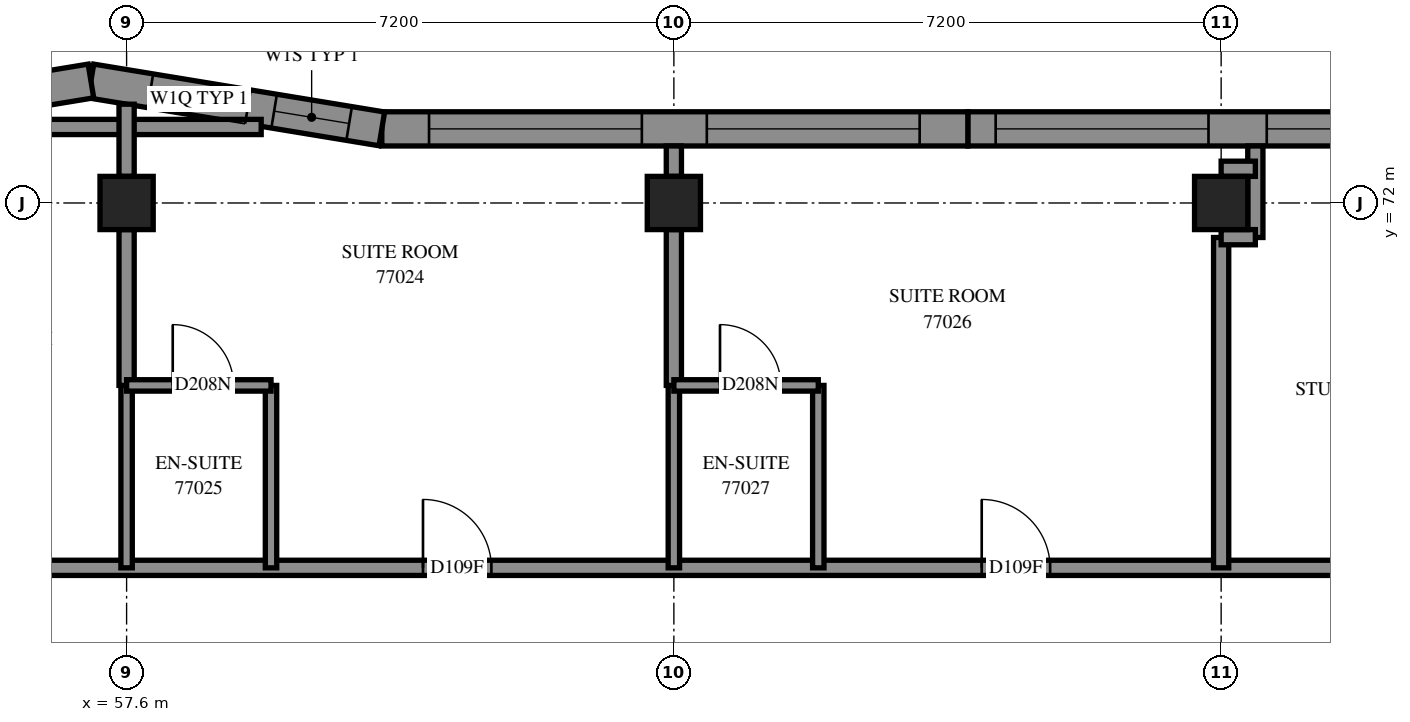
"""IFC4 building model, lengths in metres.
Left out: names, types, materials, properties, quantities, classifications, styles, units other than length and angle.
Written with IfcOpenShell. Run it as: python <this file> out.ifc"""

import sys

from ifc_helpers import new_model, si_unit, direction, frame, frame_2d, origin, origin_2d, place, context, subcontext, project, spatial, polyline, rectangle, outline, extrude, element, fill, save


model = new_model("IFC4")
c1 = context("Model", 3, precision=1e-05, world=origin(), true_north=direction((0.0, 1.0)))
c2 = subcontext(c1, "Body", "Model", "MODEL_VIEW")
j1 = project(units=[si_unit("LENGTHUNIT", "METRE"), si_unit("PLANEANGLEUNIT", "RADIAN")], contexts=[c1])
p1 = place(None, origin())
s1 = spatial("IfcSite", under=j1, at=p1, CompositionType="ELEMENT")
p2 = place(p1, origin())
s2 = spatial("IfcBuilding", under=s1, at=p2, CompositionType="ELEMENT")
p3 = place(p2, frame((0.0, 0.0, 281.2)))
s3 = spatial("IfcBuildingStorey", under=s2, at=p3, CompositionType="ELEMENT", Elevation=281.2)
for number, where, z_axis, x_axis in (
    (1, (57.6, 72.0, 0.0), (0.0, 0.0, 1.0), (1.0, 0.0, 0.0)),
    (2, (64.8, 72.0, 0.0), (0.0, 0.0, 1.0), (1.0, 0.0, 0.0)),
    (3, (72.0, 72.0, 0.0), (0.0, 0.0, 1.0), (1.0, 0.0, 0.0)),
):
    element("IfcColumn", number, at=place(p3, frame(where, z_axis=z_axis, x_axis=x_axis)), inside=s3, PredefinedType="COLUMN", context=c2, shape_type="SweptSolid", body=[
        extrude(rectangle(XDim=0.7, YDim=0.7, at=origin_2d()), origin(), (0.0, 0.0, 1.0), 3.1),
    ])
p4 = place(p3, frame((76.393, 72.975, 0.0), z_axis=(0.0, 0.0, 1.0), x_axis=(-1.0, 0.0, 0.0)))
e4 = element("IfcWall", 4, at=p4, inside=s3, PredefinedType="SOLIDWALL", context=c2, shape_type="SweptSolid", body=[
    extrude(outline(polyline([(0.035, -0.225), (7.726, -0.225), (7.726, 0.225), (-0.035, 0.225), (0.035, -0.225)])), origin(), (0.0, 0.0, 1.0), 3.1),
])
p5 = place(p4, frame((0.993, 0.0, 0.45)))
e5 = element("IfcOpeningElement", 5, at=p5, cuts=e4, PredefinedType="OPENING", context=c2, shape_type="SweptSolid", body=[
    extrude(rectangle(XDim=2.8, YDim=2.55, at=frame_2d((1.4, 1.275))), frame((0.0, 0.235, 0.0), z_axis=(0.0, -1.0, 0.0), x_axis=(1.0, 0.0, 0.0)), (0.0, 0.0, 1.0), 0.47),
])
p6 = place(p4, frame((4.56, 0.0, 0.45)))
e6 = element("IfcOpeningElement", 6, at=p6, cuts=e4, PredefinedType="OPENING", context=c2, shape_type="SweptSolid", body=[
    extrude(rectangle(XDim=2.8, YDim=2.55, at=frame_2d((1.4, 1.275))), frame((0.0, 0.235, 0.0), z_axis=(0.0, -1.0, 0.0), x_axis=(1.0, 0.0, 0.0)), (0.0, 0.0, 1.0), 0.47),
])
p7 = place(p3, frame((68.667, 72.975, 0.0), z_axis=(0.0, 0.0, 1.0), x_axis=(-1.0, 0.0, 0.0)))
e7 = element("IfcWall", 7, at=p7, inside=s3, PredefinedType="SOLIDWALL", context=c2, shape_type="SweptSolid", body=[
    extrude(outline(polyline([(0.0, -0.225), (7.691, -0.225), (7.728, 0.225), (0.0, 0.225), (0.0, -0.225)])), origin(), (0.0, 0.0, 1.0), 3.1),
])
p8 = place(p7, frame((0.634, 0.0, 0.45)))
e8 = element("IfcOpeningElement", 8, at=p8, cuts=e7, PredefinedType="OPENING", context=c2, shape_type="SweptSolid", body=[
    extrude(rectangle(XDim=2.8, YDim=2.55, at=frame_2d((1.4, 1.275))), frame((0.0, 0.235, 0.0), z_axis=(0.0, -1.0, 0.0), x_axis=(1.0, 0.0, 0.0)), (0.0, 0.0, 1.0), 0.47),
])
p9 = place(p7, frame((4.288, 0.0, 0.45)))
e9 = element("IfcOpeningElement", 9, at=p9, cuts=e7, PredefinedType="OPENING", context=c2, shape_type="SweptSolid", body=[
    extrude(rectangle(XDim=2.8, YDim=2.55, at=frame_2d((1.4, 1.275))), frame((0.0, 0.235, 0.0), z_axis=(0.0, -1.0, 0.0), x_axis=(1.0, 0.0, 0.0)), (0.0, 0.0, 1.0), 0.47),
])
p10 = place(p3, frame((60.958, 72.975, 0.0), z_axis=(0.0, 0.0, 1.0), x_axis=(-0.9867194815, 0.1624335703, 0.0)))
e10 = element("IfcWall", 10, at=p10, inside=s3, PredefinedType="SOLIDWALL", context=c2, shape_type="SweptSolid", body=[
    extrude(outline(polyline([(0.018, -0.225), (3.916, -0.225), (3.841, 0.225), (-0.018, 0.225), (0.018, -0.225)])), origin(), (0.0, 0.0, 1.0), 3.1),
])
p11 = place(p10, frame((0.436, 0.0, 0.45)))
e11 = element("IfcOpeningElement", 11, at=p11, cuts=e10, PredefinedType="OPENING", context=c2, shape_type="SweptSolid", body=[
    extrude(rectangle(XDim=1.0, YDim=2.5, at=frame_2d((0.5, 1.25))), frame((0.0, 0.235, 0.0), z_axis=(0.0, -1.0, 0.0), x_axis=(1.0, 0.0, 0.0)), (0.0, 0.0, 1.0), 0.47),
])
p12 = place(p10, frame((1.786, 0.0, 0.45)))
e12 = element("IfcOpeningElement", 12, at=p12, cuts=e10, PredefinedType="OPENING", context=c2, shape_type="SweptSolid", body=[
    extrude(rectangle(XDim=1.3, YDim=2.5, at=frame_2d((0.65, 1.25))), frame((0.0, 0.235, 0.0), z_axis=(0.0, -1.0, 0.0), x_axis=(1.0, 0.0, 0.0)), (0.0, 0.0, 1.0), 0.47),
])
p13 = place(p3, frame((57.131, 73.605, 0.0), z_axis=(0.0, 0.0, 1.0), x_axis=(-0.9867201618, -0.1624294379, 0.0)))
e13 = element("IfcWall", 13, at=p13, inside=s3, PredefinedType="SOLIDWALL", context=c2, shape_type="SweptSolid", body=[
    extrude(outline(polyline([(-0.037, -0.225), (3.86, -0.225), (3.897, 0.225), (0.037, 0.225), (-0.037, -0.225)])), origin(), (0.0, 0.0, 1.0), 3.1),
])
p14 = place(p13, frame((1.005, 0.0, 0.45)))
e14 = element("IfcOpeningElement", 14, at=p14, cuts=e13, PredefinedType="OPENING", context=c2, shape_type="SweptSolid", body=[
    extrude(rectangle(XDim=1.2, YDim=2.55, at=frame_2d((0.6, 1.275))), frame((0.0, 0.235, 0.0), z_axis=(0.0, -1.0, 0.0), x_axis=(1.0, 0.0, 0.0)), (0.0, 0.0, 1.0), 0.47),
])
p15 = place(p3, frame((55.2, 67.2, 0.0), z_axis=(0.0, 0.0, 1.0), x_axis=(1.0, 0.0, 0.0)))
e15 = element("IfcWall", 15, at=p15, inside=s3, PredefinedType="PARTITIONING", context=c2, shape_type="SweptSolid", body=[
    extrude(rectangle(XDim=19.2, YDim=0.2, at=frame_2d((9.6, 0.0))), origin(), (0.0, 0.0, 1.0), 3.1),
])
p16 = place(p15, frame((6.299, 0.0, 0.0)))
e16 = element("IfcOpeningElement", 16, at=p16, cuts=e15, PredefinedType="OPENING", context=c2, shape_type="SweptSolid", body=[
    extrude(rectangle(XDim=0.9, YDim=2.1, at=frame_2d((0.45, 1.05))), frame((0.0, 0.11, 0.0), z_axis=(0.0, -1.0, 0.0), x_axis=(1.0, 0.0, 0.0)), (0.0, 0.0, 1.0), 0.22),
])
p17 = place(p15, frame((13.65, 0.0, 0.0)))
e17 = element("IfcOpeningElement", 17, at=p17, cuts=e15, PredefinedType="OPENING", context=c2, shape_type="SweptSolid", body=[
    extrude(rectangle(XDim=0.9, YDim=2.1, at=frame_2d((0.45, 1.05))), frame((0.0, 0.11, 0.0), z_axis=(0.0, -1.0, 0.0), x_axis=(1.0, 0.0, 0.0)), (0.0, 0.0, 1.0), 0.22),
])
p18 = place(p3, frame((54.891, 73.0, 0.0), z_axis=(0.0, 0.0, 1.0), x_axis=(1.0, 0.0, 0.0)))
e18 = element("IfcWall", 18, at=p18, inside=s3, PredefinedType="PARTITIONING", context=c2, shape_type="SweptSolid", body=[
    extrude(rectangle(XDim=4.48, YDim=0.2, at=frame_2d((2.24, 0.0))), origin(), (0.0, 0.0, 1.0), 3.1),
])
p19 = place(p3, frame((72.0, 67.2, 0.0), z_axis=(0.0, 0.0, 1.0), x_axis=(0.0, 1.0, 0.0)))
e19 = element("IfcWall", 19, at=p19, inside=s3, PredefinedType="PARTITIONING", context=c2, shape_type="SweptSolid", body=[
    extrude(rectangle(XDim=4.346, YDim=0.2, at=frame_2d((2.173, 0.0))), origin(), (0.0, 0.0, 1.0), 3.1),
])
for number, where, z_axis, x_axis in (
    (20, (57.6, 67.2, 0.0), (0.0, 0.0, 1.0), (0.0, 1.0, 0.0)),
    (21, (59.5, 67.2, 0.0), (0.0, 0.0, 1.0), (0.0, 1.0, 0.0)),
    (22, (64.8, 67.2, 0.0), (0.0, 0.0, 1.0), (0.0, 1.0, 0.0)),
    (23, (66.7, 67.2, 0.0), (0.0, 0.0, 1.0), (0.0, 1.0, 0.0)),
):
    element("IfcWall", number, at=place(p3, frame(where, z_axis=z_axis, x_axis=x_axis)), inside=s3, PredefinedType="PARTITIONING", context=c2, shape_type="SweptSolid", body=[
        extrude(rectangle(XDim=2.4, YDim=0.15, at=frame_2d((1.2, 0.0))), origin(), (0.0, 0.0, 1.0), 3.1),
    ])
for number, where, z_axis, x_axis in (
    (24, (57.6, 69.6, 0.0), (0.0, 0.0, 1.0), (0.0, 1.0, 0.0)),
    (25, (64.8, 69.6, 0.0), (0.0, 0.0, 1.0), (0.0, 1.0, 0.0)),
):
    element("IfcWall", number, at=place(p3, frame(where, z_axis=z_axis, x_axis=x_axis)), inside=s3, PredefinedType="PARTITIONING", context=c2, shape_type="SweptSolid", body=[
        extrude(rectangle(XDim=2.05, YDim=0.2, at=frame_2d((1.025, 0.0))), origin(), (0.0, 0.0, 1.0), 3.1),
    ])
p20 = place(p3, frame((64.8, 69.6, 0.0), z_axis=(0.0, 0.0, 1.0), x_axis=(1.0, 0.0, 0.0)))
e26 = element("IfcWall", 26, at=p20, inside=s3, PredefinedType="PARTITIONING", context=c2, shape_type="SweptSolid", body=[
    extrude(rectangle(XDim=1.9, YDim=0.15, at=frame_2d((0.95, 0.0))), origin(), (0.0, 0.0, 1.0), 3.1),
])
p21 = place(p20, frame((0.607, 0.0, 0.0)))
e27 = element("IfcOpeningElement", 27, at=p21, cuts=e26, PredefinedType="OPENING", context=c2, shape_type="SweptSolid", body=[
    extrude(rectangle(XDim=0.8, YDim=2.1, at=frame_2d((0.4, 1.05))), frame((0.0, 0.085, 0.0), z_axis=(0.0, -1.0, 0.0), x_axis=(1.0, 0.0, 0.0)), (0.0, 0.0, 1.0), 0.17),
])
p22 = place(p3, frame((57.6, 69.6, 0.0), z_axis=(0.0, 0.0, 1.0), x_axis=(1.0, 0.0, 0.0)))
e28 = element("IfcWall", 28, at=p22, inside=s3, PredefinedType="PARTITIONING", context=c2, shape_type="SweptSolid", body=[
    extrude(rectangle(XDim=1.9, YDim=0.15, at=frame_2d((0.95, 0.0))), origin(), (0.0, 0.0, 1.0), 3.1),
])
p23 = place(p22, frame((0.607, 0.0, 0.0)))
e29 = element("IfcOpeningElement", 29, at=p23, cuts=e28, PredefinedType="OPENING", context=c2, shape_type="SweptSolid", body=[
    extrude(rectangle(XDim=0.8, YDim=2.1, at=frame_2d((0.4, 1.05))), frame((0.0, 0.085, 0.0), z_axis=(0.0, -1.0, 0.0), x_axis=(1.0, 0.0, 0.0)), (0.0, 0.0, 1.0), 0.17),
])
p24 = place(p3, frame((72.45, 71.546, 0.0), z_axis=(0.0, 0.0, 1.0), x_axis=(0.0, 1.0, 0.0)))
e30 = element("IfcWall", 30, at=p24, inside=s3, PredefinedType="PARTITIONING", context=c2, shape_type="SweptSolid", body=[
    extrude(rectangle(XDim=1.204, YDim=0.2, at=frame_2d((0.602, 0.0))), origin(), (0.0, 0.0, 1.0), 3.1),
])
p25 = place(p3, frame((57.6, 72.35, 0.0), z_axis=(0.0, 0.0, 1.0), x_axis=(0.0, 1.0, 0.0)))
e31 = element("IfcWall", 31, at=p25, inside=s3, PredefinedType="PARTITIONING", context=c2, shape_type="SweptSolid", body=[
    extrude(rectangle(XDim=0.95, YDim=0.2, at=frame_2d((0.475, 0.0))), origin(), (0.0, 0.0, 1.0), 3.1),
])
for number, where, z_axis, x_axis in (
    (32, (72.0, 71.55, 0.0), (0.0, 0.0, 1.0), (1.0, 0.0, 0.0)),
    (33, (72.0, 72.45, 0.0), (0.0, 0.0, 1.0), (1.0, 0.0, 0.0)),
):
    element("IfcWall", number, at=place(p3, frame(where, z_axis=z_axis, x_axis=x_axis)), inside=s3, PredefinedType="PARTITIONING", context=c2, shape_type="SweptSolid", body=[
        extrude(rectangle(XDim=0.45, YDim=0.2, at=frame_2d((0.225, 0.0))), origin(), (0.0, 0.0, 1.0), 3.1),
    ])
p26 = place(p3, frame((64.8, 72.35, 0.0), z_axis=(0.0, 0.0, 1.0), x_axis=(0.0, 1.0, 0.0)))
e34 = element("IfcWall", 34, at=p26, inside=s3, PredefinedType="PARTITIONING", context=c2, shape_type="SweptSolid", body=[
    extrude(rectangle(XDim=0.4, YDim=0.2, at=frame_2d((0.2, 0.0))), origin(), (0.0, 0.0, 1.0), 3.1),
])
p27 = place(p5, origin())
e35 = element("IfcWindow", 35, at=p27, inside=s3, PartitioningType="SINGLE_PANEL", PredefinedType="WINDOW", context=c2, shape_type="SweptSolid", body=[
    extrude(rectangle(XDim=2.8, YDim=2.55, at=frame_2d((1.4, 1.275))), frame((0.0, 0.205, 0.0), z_axis=(0.0, -1.0, 0.0), x_axis=(1.0, 0.0, 0.0)), (0.0, 0.0, 1.0), 0.06),
])
fill(e5, e35)
p28 = place(p6, origin())
e36 = element("IfcWindow", 36, at=p28, inside=s3, PartitioningType="SINGLE_PANEL", PredefinedType="WINDOW", context=c2, shape_type="SweptSolid", body=[
    extrude(rectangle(XDim=2.8, YDim=2.55, at=frame_2d((1.4, 1.275))), frame((0.0, 0.205, 0.0), z_axis=(0.0, -1.0, 0.0), x_axis=(1.0, 0.0, 0.0)), (0.0, 0.0, 1.0), 0.06),
])
fill(e6, e36)
p29 = place(p8, origin())
e37 = element("IfcWindow", 37, at=p29, inside=s3, PartitioningType="SINGLE_PANEL", PredefinedType="WINDOW", context=c2, shape_type="SweptSolid", body=[
    extrude(rectangle(XDim=2.8, YDim=2.55, at=frame_2d((1.4, 1.275))), frame((0.0, 0.205, 0.0), z_axis=(0.0, -1.0, 0.0), x_axis=(1.0, 0.0, 0.0)), (0.0, 0.0, 1.0), 0.06),
])
fill(e8, e37)
p30 = place(p9, origin())
e38 = element("IfcWindow", 38, at=p30, inside=s3, PartitioningType="SINGLE_PANEL", PredefinedType="WINDOW", context=c2, shape_type="SweptSolid", body=[
    extrude(rectangle(XDim=2.8, YDim=2.55, at=frame_2d((1.4, 1.275))), frame((0.0, 0.205, 0.0), z_axis=(0.0, -1.0, 0.0), x_axis=(1.0, 0.0, 0.0)), (0.0, 0.0, 1.0), 0.06),
])
fill(e9, e38)
p31 = place(p16, origin())
e39 = element("IfcDoor", 39, at=p31, inside=s3, OperationType="SINGLE_SWING_RIGHT", PredefinedType="DOOR", context=c2, shape_type="SweptSolid", body=[
    extrude(rectangle(XDim=0.9, YDim=2.1, at=frame_2d((0.45, 1.05))), frame((0.0, 0.025, 0.0), z_axis=(0.0, -1.0, 0.0), x_axis=(1.0, 0.0, 0.0)), (0.0, 0.0, 1.0), 0.05),
])
fill(e16, e39)
p32 = place(p23, origin())
e40 = element("IfcDoor", 40, at=p32, inside=s3, OperationType="SINGLE_SWING_RIGHT", PredefinedType="DOOR", context=c2, shape_type="SweptSolid", body=[
    extrude(rectangle(XDim=0.8, YDim=2.1, at=frame_2d((0.4, 1.05))), frame((0.0, 0.025, 0.0), z_axis=(0.0, -1.0, 0.0), x_axis=(1.0, 0.0, 0.0)), (0.0, 0.0, 1.0), 0.05),
])
fill(e29, e40)
p33 = place(p17, origin())
e41 = element("IfcDoor", 41, at=p33, inside=s3, OperationType="SINGLE_SWING_RIGHT", PredefinedType="DOOR", context=c2, shape_type="SweptSolid", body=[
    extrude(rectangle(XDim=0.9, YDim=2.1, at=frame_2d((0.45, 1.05))), frame((0.0, 0.025, 0.0), z_axis=(0.0, -1.0, 0.0), x_axis=(1.0, 0.0, 0.0)), (0.0, 0.0, 1.0), 0.05),
])
fill(e17, e41)
p34 = place(p21, origin())
e42 = element("IfcDoor", 42, at=p34, inside=s3, OperationType="SINGLE_SWING_RIGHT", PredefinedType="DOOR", context=c2, shape_type="SweptSolid", body=[
    extrude(rectangle(XDim=0.8, YDim=2.1, at=frame_2d((0.4, 1.05))), frame((0.0, 0.025, 0.0), z_axis=(0.0, -1.0, 0.0), x_axis=(1.0, 0.0, 0.0)), (0.0, 0.0, 1.0), 0.05),
])
fill(e27, e42)
p35 = place(p11, origin())
e43 = element("IfcWindow", 43, at=p35, inside=s3, PartitioningType="SINGLE_PANEL", PredefinedType="WINDOW", context=c2, shape_type="SweptSolid", body=[
    extrude(rectangle(XDim=1.0, YDim=2.5, at=frame_2d((0.5, 1.25))), frame((0.0, 0.205, 0.0), z_axis=(0.0, -1.0, 0.0), x_axis=(1.0, 0.0, 0.0)), (0.0, 0.0, 1.0), 0.06),
])
fill(e11, e43)
p36 = place(p12, origin())
e44 = element("IfcWindow", 44, at=p36, inside=s3, PartitioningType="SINGLE_PANEL", PredefinedType="WINDOW", context=c2, shape_type="SweptSolid", body=[
    extrude(rectangle(XDim=1.3, YDim=2.5, at=frame_2d((0.65, 1.25))), frame((0.0, 0.135, 0.0), z_axis=(0.0, -1.0, 0.0), x_axis=(1.0, 0.0, 0.0)), (0.0, 0.0, 1.0), 0.06),
])
fill(e12, e44)
save(model, sys.argv[1])
